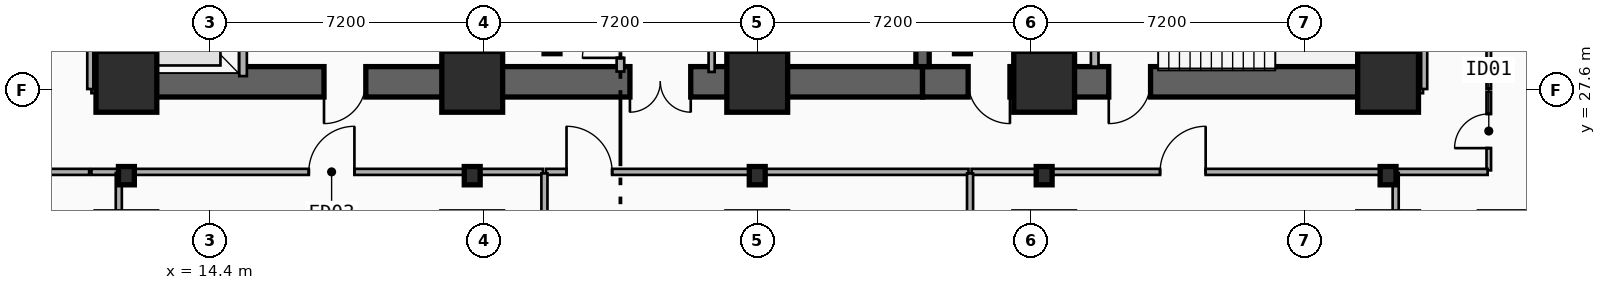
"""IFC4 building model, lengths in metres.
Left out: names, types, materials, properties, quantities, classifications, styles, units other than length and angle.
Written with IfcOpenShell. Run it as: python <this file> out.ifc"""

import sys

from ifc_helpers import new_model, si_unit, direction, frame, frame_2d, origin, origin_2d, place, context, subcontext, project, spatial, rectangle, i_section, extrude, element, fill, save


model = new_model("IFC4")
c1 = context("Model", 3, precision=1e-05, world=origin(), true_north=direction((0.0, 1.0)))
c2 = subcontext(c1, "Body", "Model", "MODEL_VIEW")
j1 = project(units=[si_unit("LENGTHUNIT", "METRE"), si_unit("PLANEANGLEUNIT", "RADIAN")], contexts=[c1])
p1 = place(None, origin())
s1 = spatial("IfcSite", under=j1, at=p1, CompositionType="ELEMENT")
p2 = place(p1, origin())
s2 = spatial("IfcBuilding", under=s1, at=p2, CompositionType="ELEMENT")
p3 = place(p2, frame((0.0, 0.0, -8.8)))
s3 = spatial("IfcBuildingStorey", under=s2, at=p3, CompositionType="ELEMENT", Elevation=-8.8)
p4 = place(p3, frame((21.18, 27.82, 0.0), z_axis=(0.0, 0.0, 1.0), x_axis=(-1.0, 0.0, 0.0)))
e1 = element("IfcWall", 1, at=p4, inside=s3, PredefinedType="SHEAR", context=c2, shape_type="SweptSolid", body=[
    extrude(rectangle(XDim=9.03, YDim=0.8, at=frame_2d((4.515, 0.0))), origin(), (0.0, 0.0, 1.0), 4.4),
])
p5 = place(p4, frame((2.68, 0.0, 0.0)))
e2 = element("IfcOpeningElement", 2, at=p5, cuts=e1, PredefinedType="OPENING", context=c2, shape_type="SweptSolid", body=[
    extrude(rectangle(XDim=1.1, YDim=2.15, at=frame_2d((0.55, 1.075))), frame((0.0, 0.41, 0.0), z_axis=(0.0, -1.0, 0.0), x_axis=(1.0, 0.0, 0.0)), (0.0, 0.0, 1.0), 0.82),
])
p6 = place(p3, frame((33.15, 27.82, 0.0), z_axis=(0.0, 0.0, 1.0), x_axis=(-1.0, 0.0, 0.0)))
e3 = element("IfcWall", 3, at=p6, inside=s3, PredefinedType="SHEAR", context=c2, shape_type="SweptSolid", body=[
    extrude(rectangle(XDim=11.97, YDim=0.8, at=frame_2d((5.985, 0.0))), origin(), (0.0, 0.0, 1.0), 4.4),
])
p7 = place(p6, frame((6.1, 0.0, 0.0)))
e4 = element("IfcOpeningElement", 4, at=p7, cuts=e3, PredefinedType="OPENING", context=c2, shape_type="SweptSolid", body=[
    extrude(rectangle(XDim=1.6, YDim=2.2, at=frame_2d((0.8, 1.1))), frame((0.0, 0.41, 0.0), z_axis=(0.0, -1.0, 0.0), x_axis=(1.0, 0.0, 0.0)), (0.0, 0.0, 1.0), 0.82),
])
p8 = place(p3, frame((45.38, 27.82, 0.0), z_axis=(0.0, 0.0, 1.0), x_axis=(-1.0, 0.0, 0.0)))
e5 = element("IfcWall", 5, at=p8, inside=s3, PredefinedType="SHEAR", context=c2, shape_type="SweptSolid", body=[
    extrude(rectangle(XDim=12.23, YDim=0.8, at=frame_2d((6.115, 0.0))), origin(), (0.0, 0.0, 1.0), 4.4),
])
p9 = place(p8, frame((9.93, 0.0, 0.0)))
e6 = element("IfcOpeningElement", 6, at=p9, cuts=e5, PredefinedType="OPENING", context=c2, shape_type="SweptSolid", body=[
    extrude(rectangle(XDim=1.1, YDim=2.15, at=frame_2d((0.55, 1.075))), frame((0.0, 0.41, 0.0), z_axis=(0.0, -1.0, 0.0), x_axis=(1.0, 0.0, 0.0)), (0.0, 0.0, 1.0), 0.82),
])
p10 = place(p8, frame((6.23, 0.0, 0.0)))
e7 = element("IfcOpeningElement", 7, at=p10, cuts=e5, PredefinedType="OPENING", context=c2, shape_type="SweptSolid", body=[
    extrude(rectangle(XDim=1.1, YDim=2.15, at=frame_2d((0.55, 1.075))), frame((0.0, 0.41, 0.0), z_axis=(0.0, -1.0, 0.0), x_axis=(1.0, 0.0, 0.0)), (0.0, 0.0, 1.0), 0.82),
])
for number, where, z_axis, x_axis in (
    (8, (12.15, 28.22, 0.0), (0.0, 0.0, 1.0), (0.0, 1.0, 0.0)),
    (9, (45.38, 28.22, 0.0), (0.0, 0.0, 1.0), (0.0, 1.0, 0.0)),
):
    element("IfcWall", number, at=place(p3, frame(where, z_axis=z_axis, x_axis=x_axis)), inside=s3, PredefinedType="SHEAR", context=c2, shape_type="SweptSolid", body=[
        extrude(rectangle(XDim=8.43, YDim=0.8, at=frame_2d((4.215, 0.0))), origin(), (0.0, 0.0, 1.0), 4.4),
    ])
for number, where, z_axis, x_axis in (
    (10, (21.18, 28.22, 0.0), (0.0, 0.0, 1.0), (0.0, 1.0, 0.0)),
    (11, (33.15, 28.22, 0.0), (0.0, 0.0, 1.0), (0.0, 1.0, 0.0)),
):
    element("IfcWall", number, at=place(p3, frame(where, z_axis=z_axis, x_axis=x_axis)), inside=s3, PredefinedType="SHEAR", context=c2, shape_type="SweptSolid", body=[
        extrude(rectangle(XDim=8.43, YDim=0.35, at=frame_2d((4.215, 0.0))), origin(), (0.0, 0.0, 1.0), 4.4),
    ])
p11 = place(p3, frame((36.38, 28.22, 0.0), z_axis=(0.0, 0.0, 1.0), x_axis=(0.0, 1.0, 0.0)))
e12 = element("IfcWall", 12, at=p11, inside=s3, PredefinedType="SHEAR", context=c2, shape_type="SweptSolid", body=[
    extrude(rectangle(XDim=8.43, YDim=0.35, at=frame_2d((4.215, 0.0))), origin(), (0.0, 0.0, 1.0), 4.4),
])
p12 = place(p11, frame((3.56, 0.0, 0.0)))
e13 = element("IfcOpeningElement", 13, at=p12, cuts=e12, PredefinedType="OPENING", context=c2, shape_type="SweptSolid", body=[
    extrude(rectangle(XDim=1.1, YDim=2.15, at=frame_2d((0.55, 1.075))), frame((0.0, 0.185, 0.0), z_axis=(0.0, -1.0, 0.0), x_axis=(1.0, 0.0, 0.0)), (0.0, 0.0, 1.0), 0.37),
])
for number, where, z_axis, x_axis in (
    (14, (23.4, 28.8, 0.0), (0.0, 0.0, 1.0), (1.0, 0.0, 0.0)),
    (15, (34.2, 28.8, 0.0), (0.0, 0.0, 1.0), (1.0, 0.0, 0.0)),
):
    element("IfcColumn", number, at=place(p3, frame(where, z_axis=z_axis, x_axis=x_axis)), inside=s3, PredefinedType="COLUMN", context=c2, shape_type="SweptSolid", body=[
        extrude(i_section(OverallWidth=0.418, OverallDepth=0.481, WebThickness=0.043, FlangeThickness=0.068, FilletRadius=0.015, at=origin_2d()), origin(), (0.0, 0.0, 1.0), 4.4),
    ])
for number, where, z_axis, x_axis in (
    (16, (12.2, 27.82, 0.0), (0.0, 0.0, 1.0), (1.0, 0.0, 0.0)),
    (17, (21.3, 27.82, 0.0), (0.0, 0.0, 1.0), (1.0, 0.0, 0.0)),
    (18, (28.8, 27.82, 0.0), (0.0, 0.0, 1.0), (1.0, 0.0, 0.0)),
    (19, (36.35, 27.82, 0.0), (0.0, 0.0, 1.0), (1.0, 0.0, 0.0)),
    (20, (45.4, 27.82, 0.0), (0.0, 0.0, 1.0), (1.0, 0.0, 0.0)),
):
    element("IfcColumn", number, at=place(p3, frame(where, z_axis=z_axis, x_axis=x_axis)), inside=s3, PredefinedType="COLUMN", context=c2, shape_type="SweptSolid", body=[
        extrude(rectangle(XDim=1.6, YDim=1.6, at=origin_2d()), origin(), (0.0, 0.0, 1.0), 4.4),
    ])
for number, where, z_axis, x_axis in (
    (21, (12.2, 25.35, 0.0), (0.0, 0.0, 1.0), (1.0, 0.0, 0.0)),
    (22, (21.3, 25.35, 0.0), (0.0, 0.0, 1.0), (1.0, 0.0, 0.0)),
    (23, (28.8, 25.35, 0.0), (0.0, 0.0, 1.0), (1.0, 0.0, 0.0)),
    (24, (36.35, 25.35, 0.0), (0.0, 0.0, 1.0), (1.0, 0.0, 0.0)),
    (25, (45.4, 25.35, 0.0), (0.0, 0.0, 1.0), (1.0, 0.0, 0.0)),
):
    element("IfcColumn", number, at=place(p3, frame(where, z_axis=z_axis, x_axis=x_axis)), inside=s3, PredefinedType="COLUMN", context=c2, shape_type="SweptSolid", body=[
        extrude(i_section(OverallWidth=0.418, OverallDepth=0.481, WebThickness=0.043, FlangeThickness=0.068, FilletRadius=0.015, at=origin_2d()), origin(), (0.0, 0.0, 1.0), 4.4),
    ])
p13 = place(p3, frame((15.27, 27.97, 0.0), z_axis=(0.0, 0.0, 1.0), x_axis=(0.0, 1.0, 0.0)))
e26 = element("IfcWall", 26, at=p13, inside=s3, PredefinedType="PARTITIONING", context=c2, shape_type="SweptSolid", body=[
    extrude(rectangle(XDim=2.96, YDim=0.2, at=frame_2d((1.48, 0.0))), origin(), (0.0, 0.0, 1.0), 3.052),
])
p14 = place(p13, frame((0.93, 0.0, 0.0)))
e27 = element("IfcOpeningElement", 27, at=p14, cuts=e26, PredefinedType="OPENING", context=c2, shape_type="SweptSolid", body=[
    extrude(rectangle(XDim=1.1, YDim=2.15, at=frame_2d((0.55, 1.075))), frame((0.0, 0.11, 0.0), z_axis=(0.0, -1.0, 0.0), x_axis=(1.0, 0.0, 0.0)), (0.0, 0.0, 1.0), 0.22),
])
p15 = place(p3, frame((37.68, 28.22, 0.0), z_axis=(0.0, 0.0, 1.0), x_axis=(0.0, 1.0, 0.0)))
e28 = element("IfcWall", 28, at=p15, inside=s3, PredefinedType="PARTITIONING", context=c2, shape_type="SweptSolid", body=[
    extrude(rectangle(XDim=3.03, YDim=0.2, at=frame_2d((1.515, 0.0))), origin(), (0.0, 0.0, 1.0), 4.08),
])
p16 = place(p3, frame((25.2, 28.09, 0.0), z_axis=(0.0, 0.0, 1.0), x_axis=(0.0, 1.0, 0.0)))
e29 = element("IfcWall", 29, at=p16, inside=s3, PredefinedType="PARTITIONING", context=c2, shape_type="SweptSolid", body=[
    extrude(rectangle(XDim=1.72, YDim=0.2, at=frame_2d((0.86, 0.0))), origin(), (0.0, 0.0, 1.0), 4.08),
])
p17 = place(p16, frame((0.36, 0.0, 0.0)))
e30 = element("IfcOpeningElement", 30, at=p17, cuts=e29, PredefinedType="OPENING", context=c2, shape_type="SweptSolid", body=[
    extrude(rectangle(XDim=1.0, YDim=2.15, at=frame_2d((0.5, 1.075))), frame((0.0, 0.11, 0.0), z_axis=(0.0, -1.0, 0.0), x_axis=(1.0, 0.0, 0.0)), (0.0, 0.0, 1.0), 0.22),
])
p18 = place(p3, frame((48.05, 25.49, 0.0), z_axis=(0.0, 0.0, 1.0), x_axis=(0.0, 1.0, 0.0)))
e31 = element("IfcWall", 31, at=p18, inside=s3, PredefinedType="PARTITIONING", context=c2, shape_type="SweptSolid", body=[
    extrude(rectangle(XDim=2.07, YDim=0.12, at=frame_2d((1.035, 0.0))), origin(), (0.0, 0.0, 1.0), 4.08),
])
p19 = place(p18, frame((0.585, 0.0, 0.0)))
e32 = element("IfcOpeningElement", 32, at=p19, cuts=e31, PredefinedType="OPENING", context=c2, shape_type="SweptSolid", body=[
    extrude(rectangle(XDim=0.9, YDim=2.1, at=frame_2d((0.45, 1.05))), frame((0.0, 0.07, 0.0), z_axis=(0.0, -1.0, 0.0), x_axis=(1.0, 0.0, 0.0)), (0.0, 0.0, 1.0), 0.14),
])
p20 = place(p3, frame((12.04, 25.45, 0.0), z_axis=(0.0, 0.0, 1.0), x_axis=(1.0, 0.0, 0.0)))
e33 = element("IfcWall", 33, at=p20, inside=s3, PredefinedType="PARTITIONING", context=c2, shape_type="SweptSolid", body=[
    extrude(rectangle(XDim=11.12, YDim=0.16, at=frame_2d((5.56, 0.0))), origin(), (0.0, 0.0, 1.0), 3.246),
])
p21 = place(p20, frame((4.96, 0.0, 0.0)))
e34 = element("IfcOpeningElement", 34, at=p21, cuts=e33, PredefinedType="OPENING", context=c2, shape_type="SweptSolid", body=[
    extrude(rectangle(XDim=1.2, YDim=2.15, at=frame_2d((0.6, 1.075))), frame((0.0, 0.09, 0.0), z_axis=(0.0, -1.0, 0.0), x_axis=(1.0, 0.0, 0.0)), (0.0, 0.0, 1.0), 0.18),
])
p22 = place(p3, frame((23.24, 25.45, 0.0), z_axis=(0.0, 0.0, 1.0), x_axis=(1.0, 0.0, 0.0)))
e35 = element("IfcWall", 35, at=p22, inside=s3, PredefinedType="PARTITIONING", context=c2, shape_type="SweptSolid", body=[
    extrude(rectangle(XDim=11.12, YDim=0.16, at=frame_2d((5.56, 0.0))), origin(), (0.0, 0.0, 1.0), 4.08),
])
p23 = place(p22, frame((0.542, 0.0, 0.0)))
e36 = element("IfcOpeningElement", 36, at=p23, cuts=e35, PredefinedType="OPENING", context=c2, shape_type="SweptSolid", body=[
    extrude(rectangle(XDim=1.2, YDim=2.15, at=frame_2d((0.6, 1.075))), frame((0.0, 0.09, 0.0), z_axis=(0.0, -1.0, 0.0), x_axis=(1.0, 0.0, 0.0)), (0.0, 0.0, 1.0), 0.18),
])
p24 = place(p3, frame((34.44, 25.45, 0.0), z_axis=(0.0, 0.0, 1.0), x_axis=(1.0, 0.0, 0.0)))
e37 = element("IfcWall", 37, at=p24, inside=s3, PredefinedType="PARTITIONING", context=c2, shape_type="SweptSolid", body=[
    extrude(rectangle(XDim=11.12, YDim=0.16, at=frame_2d((5.56, 0.0))), origin(), (0.0, 0.0, 1.0), 3.246),
])
p25 = place(p24, frame((4.96, 0.0, 0.0)))
e38 = element("IfcOpeningElement", 38, at=p25, cuts=e37, PredefinedType="OPENING", context=c2, shape_type="SweptSolid", body=[
    extrude(rectangle(XDim=1.2, YDim=2.15, at=frame_2d((0.6, 1.075))), frame((0.0, 0.09, 0.0), z_axis=(0.0, -1.0, 0.0), x_axis=(1.0, 0.0, 0.0)), (0.0, 0.0, 1.0), 0.18),
])
p26 = place(p3, frame((48.05, 27.64, 0.0), z_axis=(0.0, 0.0, 1.0), x_axis=(0.0, 1.0, 0.0)))
e39 = element("IfcWall", 39, at=p26, inside=s3, PredefinedType="PARTITIONING", context=c2, shape_type="SweptSolid", body=[
    extrude(rectangle(XDim=10.27, YDim=0.12, at=frame_2d((5.135, 0.0))), origin(), (0.0, 0.0, 1.0), 4.08),
])
p27 = place(p26, frame((4.685, 0.0, 0.0)))
e40 = element("IfcOpeningElement", 40, at=p27, cuts=e39, PredefinedType="OPENING", context=c2, shape_type="SweptSolid", body=[
    extrude(rectangle(XDim=0.9, YDim=2.1, at=frame_2d((0.45, 1.05))), frame((0.0, 0.07, 0.0), z_axis=(0.0, -1.0, 0.0), x_axis=(1.0, 0.0, 0.0)), (0.0, 0.0, 1.0), 0.14),
])
for number, where, z_axis, x_axis in (
    (41, (23.2, 18.04, 0.0), (0.0, 0.0, 1.0), (0.0, 1.0, 0.0)),
    (42, (34.4, 18.04, 0.0), (0.0, 0.0, 1.0), (0.0, 1.0, 0.0)),
):
    element("IfcWall", number, at=place(p3, frame(where, z_axis=z_axis, x_axis=x_axis)), inside=s3, PredefinedType="PARTITIONING", context=c2, shape_type="SweptSolid", body=[
        extrude(rectangle(XDim=7.37, YDim=0.16, at=frame_2d((3.685, 0.0))), origin(), (0.0, 0.0, 1.0), 2.66),
    ])
p28 = place(p3, frame((27.6, 28.08, 0.0), z_axis=(0.0, 0.0, 1.0), x_axis=(0.0, 1.0, 0.0)))
e43 = element("IfcWall", 43, at=p28, inside=s3, PredefinedType="PARTITIONING", context=c2, shape_type="SweptSolid", body=[
    extrude(rectangle(XDim=2.64, YDim=0.16, at=frame_2d((1.32, 0.0))), origin(), (0.0, 0.0, 1.0), 4.08),
])
p29 = place(p3, frame((11.28, 25.45, 0.0), z_axis=(0.0, 0.0, 1.0), x_axis=(1.0, 0.0, 0.0)))
e44 = element("IfcWall", 44, at=p29, inside=s3, PredefinedType="PARTITIONING", context=c2, shape_type="SweptSolid", body=[
    extrude(rectangle(XDim=0.69, YDim=0.16, at=frame_2d((0.345, 0.0))), origin(), (0.0, 0.0, 1.0), 3.246),
])
p30 = place(p3, frame((45.63, 25.45, 0.0), z_axis=(0.0, 0.0, 1.0), x_axis=(1.0, 0.0, 0.0)))
e45 = element("IfcWall", 45, at=p30, inside=s3, PredefinedType="PARTITIONING", context=c2, shape_type="SweptSolid", body=[
    extrude(rectangle(XDim=2.39, YDim=0.16, at=frame_2d((1.195, 0.0))), origin(), (0.0, 0.0, 1.0), 3.246),
])
p31 = place(p3, frame((11.28, 27.6, 0.0), z_axis=(0.0, 0.0, 1.0), x_axis=(1.0, 0.0, 0.0)))
e46 = element("IfcWall", 46, at=p31, inside=s3, PredefinedType="PARTITIONING", context=c2, shape_type="SweptSolid", body=[
    extrude(rectangle(XDim=0.84, YDim=0.16, at=frame_2d((0.42, 0.0))), origin(), (0.0, 0.0, 1.0), 3.052),
])
p32 = place(p3, frame((45.41, 27.6, 0.0), z_axis=(0.0, 0.0, 1.0), x_axis=(1.0, 0.0, 0.0)))
e47 = element("IfcWall", 47, at=p32, inside=s3, PredefinedType="PARTITIONING", context=c2, shape_type="SweptSolid", body=[
    extrude(rectangle(XDim=0.91, YDim=0.16, at=frame_2d((0.455, 0.0))), origin(), (0.0, 0.0, 1.0), 3.052),
])
p33 = place(p3, frame((46.35, 27.63, 0.0), z_axis=(0.0, 0.0, 1.0), x_axis=(0.0, 1.0, 0.0)))
e48 = element("IfcWall", 48, at=p33, inside=s3, PredefinedType="PARTITIONING", context=c2, shape_type="SweptSolid", body=[
    extrude(rectangle(XDim=10.29, YDim=0.16, at=frame_2d((5.145, 0.0))), origin(), (0.0, 0.0, 1.0), 4.08),
])
p34 = place(p3, frame((1.83, 25.45, 0.0), z_axis=(0.0, 0.0, 1.0), x_axis=(1.0, 0.0, 0.0)))
e49 = element("IfcWall", 49, at=p34, inside=s3, PredefinedType="PARTITIONING", context=c2, shape_type="SweptSolid", body=[
    extrude(rectangle(XDim=9.39, YDim=0.16, at=frame_2d((4.695, 0.0))), origin(), (0.0, 0.0, 1.0), 4.08),
])
p35 = place(p3, frame((11.25, 27.63, 0.0), z_axis=(0.0, 0.0, 1.0), x_axis=(0.0, 1.0, 0.0)))
e50 = element("IfcWall", 50, at=p35, inside=s3, PredefinedType="PARTITIONING", context=c2, shape_type="SweptSolid", body=[
    extrude(rectangle(XDim=10.29, YDim=0.16, at=frame_2d((5.145, 0.0))), origin(), (0.0, 0.0, 1.0), 4.08),
])
for number, where, z_axis, x_axis in (
    (51, (12.0, 18.03, 0.0), (0.0, 0.0, 1.0), (0.0, 1.0, 0.0)),
    (52, (45.6, 18.03, 0.0), (0.0, 0.0, 1.0), (0.0, 1.0, 0.0)),
):
    element("IfcWall", number, at=place(p3, frame(where, z_axis=z_axis, x_axis=x_axis)), inside=s3, PredefinedType="PARTITIONING", context=c2, shape_type="SweptSolid", body=[
        extrude(rectangle(XDim=7.39, YDim=0.16, at=frame_2d((3.695, 0.0))), origin(), (0.0, 0.0, 1.0), 2.66),
    ])
p36 = place(p5, origin())
e53 = element("IfcDoor", 53, at=p36, inside=s3, OperationType="SINGLE_SWING_RIGHT", PredefinedType="DOOR", context=c2, shape_type="SweptSolid", body=[
    extrude(rectangle(XDim=1.1, YDim=2.15, at=frame_2d((0.55, 1.075))), frame((0.0, 0.025, 0.0), z_axis=(0.0, -1.0, 0.0), x_axis=(1.0, 0.0, 0.0)), (0.0, 0.0, 1.0), 0.05),
])
fill(e2, e53)
p37 = place(p9, origin())
e54 = element("IfcDoor", 54, at=p37, inside=s3, OperationType="SINGLE_SWING_LEFT", PredefinedType="DOOR", context=c2, shape_type="SweptSolid", body=[
    extrude(rectangle(XDim=1.1, YDim=2.15, at=frame_2d((0.55, 1.075))), frame((0.0, 0.025, 0.0), z_axis=(0.0, -1.0, 0.0), x_axis=(1.0, 0.0, 0.0)), (0.0, 0.0, 1.0), 0.05),
])
fill(e6, e54)
p38 = place(p10, origin())
e55 = element("IfcDoor", 55, at=p38, inside=s3, OperationType="SINGLE_SWING_RIGHT", PredefinedType="DOOR", context=c2, shape_type="SweptSolid", body=[
    extrude(rectangle(XDim=1.1, YDim=2.15, at=frame_2d((0.55, 1.075))), frame((0.0, 0.025, 0.0), z_axis=(0.0, -1.0, 0.0), x_axis=(1.0, 0.0, 0.0)), (0.0, 0.0, 1.0), 0.05),
])
fill(e7, e55)
p39 = place(p7, origin())
e56 = element("IfcDoor", 56, at=p39, inside=s3, OperationType="SINGLE_SWING_LEFT", PredefinedType="DOOR", context=c2, shape_type="SweptSolid", body=[
    extrude(rectangle(XDim=1.6, YDim=2.2, at=frame_2d((0.8, 1.1))), frame((0.0, 0.025, 0.0), z_axis=(0.0, -1.0, 0.0), x_axis=(1.0, 0.0, 0.0)), (0.0, 0.0, 1.0), 0.05),
])
fill(e4, e56)
p40 = place(p17, origin())
e57 = element("IfcDoor", 57, at=p40, inside=s3, OperationType="SINGLE_SWING_LEFT", PredefinedType="DOOR", context=c2, shape_type="SweptSolid", body=[
    extrude(rectangle(XDim=1.0, YDim=2.15, at=frame_2d((0.5, 1.075))), frame((0.0, 0.025, 0.0), z_axis=(0.0, -1.0, 0.0), x_axis=(1.0, 0.0, 0.0)), (0.0, 0.0, 1.0), 0.05),
])
fill(e30, e57)
p41 = place(p19, origin())
e58 = element("IfcDoor", 58, at=p41, inside=s3, OperationType="SINGLE_SWING_LEFT", PredefinedType="DOOR", context=c2, shape_type="SweptSolid", body=[
    extrude(rectangle(XDim=0.9, YDim=2.1, at=frame_2d((0.45, 1.05))), frame((0.0, 0.025, 0.0), z_axis=(0.0, -1.0, 0.0), x_axis=(1.0, 0.0, 0.0)), (0.0, 0.0, 1.0), 0.05),
])
fill(e32, e58)
p42 = place(p21, origin())
e59 = element("IfcDoor", 59, at=p42, inside=s3, OperationType="SINGLE_SWING_RIGHT", PredefinedType="DOOR", context=c2, shape_type="SweptSolid", body=[
    extrude(rectangle(XDim=1.2, YDim=2.15, at=frame_2d((0.6, 1.075))), frame((0.0, 0.025, 0.0), z_axis=(0.0, -1.0, 0.0), x_axis=(1.0, 0.0, 0.0)), (0.0, 0.0, 1.0), 0.05),
])
fill(e34, e59)
p43 = place(p23, origin())
e60 = element("IfcDoor", 60, at=p43, inside=s3, OperationType="SINGLE_SWING_LEFT", PredefinedType="DOOR", context=c2, shape_type="SweptSolid", body=[
    extrude(rectangle(XDim=1.2, YDim=2.15, at=frame_2d((0.6, 1.075))), frame((0.0, 0.025, 0.0), z_axis=(0.0, -1.0, 0.0), x_axis=(1.0, 0.0, 0.0)), (0.0, 0.0, 1.0), 0.05),
])
fill(e36, e60)
p44 = place(p25, origin())
e61 = element("IfcDoor", 61, at=p44, inside=s3, OperationType="SINGLE_SWING_RIGHT", PredefinedType="DOOR", context=c2, shape_type="SweptSolid", body=[
    extrude(rectangle(XDim=1.2, YDim=2.15, at=frame_2d((0.6, 1.075))), frame((0.0, 0.025, 0.0), z_axis=(0.0, -1.0, 0.0), x_axis=(1.0, 0.0, 0.0)), (0.0, 0.0, 1.0), 0.05),
])
fill(e38, e61)
save(model, sys.argv[1])
